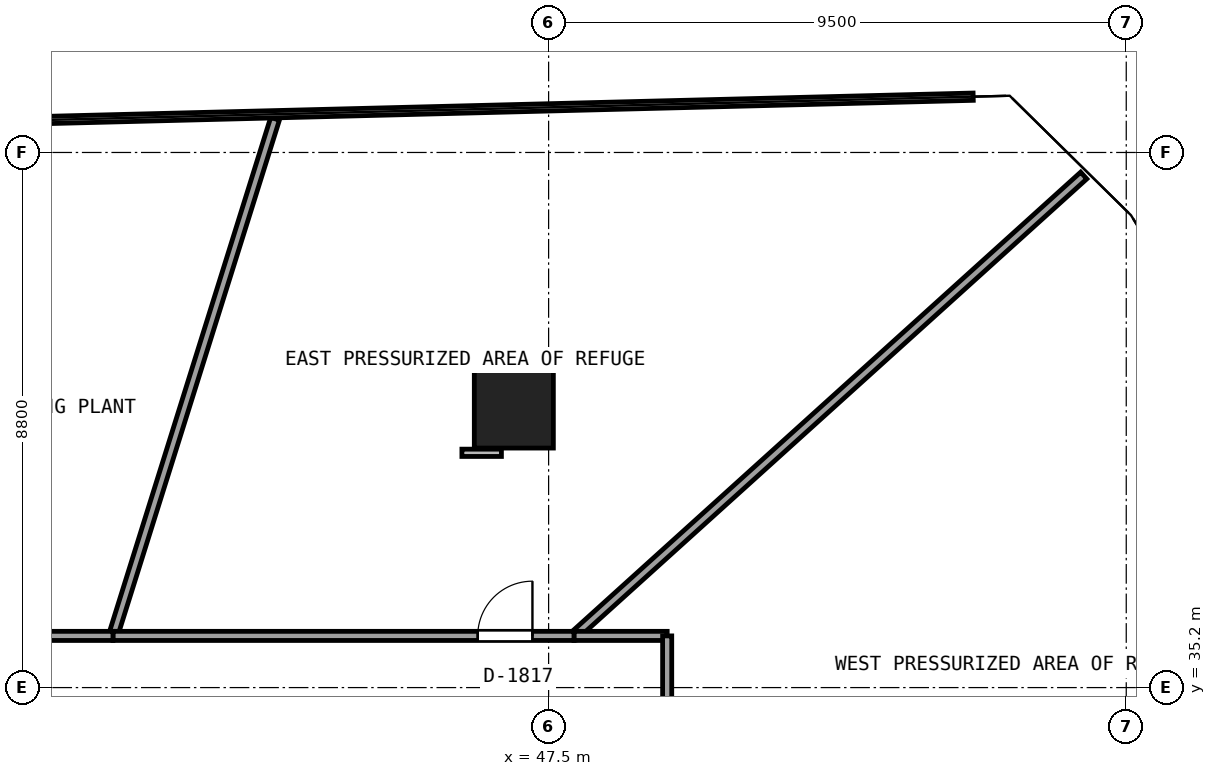
"""IFC4 building model, lengths in metres.
Left out: names, types, materials, properties, quantities, classifications, styles, units other than length and angle.
Written with IfcOpenShell. Run it as: python <this file> out.ifc"""

import sys

from ifc_helpers import new_model, si_unit, direction, frame, frame_2d, origin, origin_2d, place, context, subcontext, project, spatial, rectangle, extrude, element, fill, save


model = new_model("IFC4")
c1 = context("Model", 3, precision=1e-05, world=origin(), true_north=direction((0.0, 1.0)))
c2 = subcontext(c1, "Body", "Model", "MODEL_VIEW")
j1 = project(units=[si_unit("LENGTHUNIT", "METRE"), si_unit("PLANEANGLEUNIT", "RADIAN")], contexts=[c1])
p1 = place(None, origin())
s1 = spatial("IfcSite", under=j1, at=p1, CompositionType="ELEMENT")
p2 = place(p1, origin())
s2 = spatial("IfcBuilding", under=s1, at=p2, CompositionType="ELEMENT")
p3 = place(p2, frame((0.0, 0.0, 71.85)))
s3 = spatial("IfcBuildingStorey", under=s2, at=p3, CompositionType="ELEMENT", Elevation=71.85)
p4 = place(p3, frame((46.928, 39.789, 0.0), z_axis=(0.0, 0.0, 1.0), x_axis=(1.0, 0.0, 0.0)))
e1 = element("IfcColumn", 1, at=p4, inside=s3, PredefinedType="COLUMN", context=c2, shape_type="SweptSolid", body=[
    extrude(rectangle(XDim=1.3, YDim=1.3, at=origin_2d()), origin(), (0.0, 0.0, 1.0), 4.08),
])
p5 = place(p3, frame((56.301, 43.621, 0.0), z_axis=(0.0, 0.0, 1.0), x_axis=(-0.74217442222, -0.670206779287, 0.0)))
e2 = element("IfcWall", 2, at=p5, inside=s3, PredefinedType="PARTITIONING", context=c2, shape_type="SweptSolid", body=[
    extrude(rectangle(XDim=11.297, YDim=0.15, at=frame_2d((5.648, 0.0))), origin(), (0.0, 0.0, 1.0), 3.265),
])
p6 = place(p3, frame((47.917, 36.05, 0.0), z_axis=(0.0, 0.0, 1.0), x_axis=(1.0, 0.0, 0.0)))
e3 = element("IfcWall", 3, at=p6, inside=s3, PredefinedType="PARTITIONING", context=c2, shape_type="SweptSolid", body=[
    extrude(rectangle(XDim=1.533, YDim=0.15, at=frame_2d((0.767, 0.0))), origin(), (0.0, 0.0, 1.0), 3.265),
])
p7 = place(p3, frame((49.45, 36.05, 0.0), z_axis=(0.0, 0.0, 1.0), x_axis=(0.0, -1.0, 0.0)))
e4 = element("IfcWall", 4, at=p7, inside=s3, PredefinedType="PARTITIONING", context=c2, shape_type="SweptSolid", body=[
    extrude(rectangle(XDim=1.85, YDim=0.15, at=frame_2d((0.925, 0.0))), origin(), (0.0, 0.0, 1.0), 3.265),
])
p8 = place(p3, frame((43.001, 44.554, 0.0), z_axis=(0.0, 0.0, 1.0), x_axis=(-0.299148373838, -0.954206607832, 0.0)))
e5 = element("IfcWall", 5, at=p8, inside=s3, PredefinedType="PARTITIONING", context=c2, shape_type="SweptSolid", body=[
    extrude(rectangle(XDim=8.912, YDim=0.15, at=frame_2d((4.456, 0.0))), origin(), (0.0, 0.0, 1.0), 3.265),
])
p9 = place(p3, frame((40.335, 36.05, 0.0), z_axis=(0.0, 0.0, 1.0), x_axis=(1.0, 0.0, 0.0)))
e6 = element("IfcWall", 6, at=p9, inside=s3, PredefinedType="PARTITIONING", context=c2, shape_type="SweptSolid", body=[
    extrude(rectangle(XDim=7.582, YDim=0.15, at=frame_2d((3.791, 0.0))), origin(), (0.0, 0.0, 1.0), 3.065),
])
p10 = place(p9, frame((5.999, 0.0, 0.0)))
e7 = element("IfcOpeningElement", 7, at=p10, cuts=e6, PredefinedType="OPENING", context=c2, shape_type="SweptSolid", body=[
    extrude(rectangle(XDim=0.9, YDim=2.0, at=frame_2d((0.45, 1.0))), frame((0.0, 0.085, 0.0), z_axis=(0.0, -1.0, 0.0), x_axis=(1.0, 0.0, 0.0)), (0.0, 0.0, 1.0), 0.17),
])
p11 = place(p3, frame((35.149, 36.05, 0.0), z_axis=(0.0, 0.0, 1.0), x_axis=(1.0, 0.0, 0.0)))
e8 = element("IfcWall", 8, at=p11, inside=s3, PredefinedType="PARTITIONING", context=c2, shape_type="SweptSolid", body=[
    extrude(rectangle(XDim=5.186, YDim=0.15, at=frame_2d((2.593, 0.0))), origin(), (0.0, 0.0, 1.0), 3.065),
])
p12 = place(p11, frame((2.143, 0.0, 0.0)))
e9 = element("IfcOpeningElement", 9, at=p12, cuts=e8, PredefinedType="OPENING", context=c2, shape_type="SweptSolid", body=[
    extrude(rectangle(XDim=0.9, YDim=2.0, at=frame_2d((0.45, 1.0))), frame((0.0, 0.085, 0.0), z_axis=(0.0, -1.0, 0.0), x_axis=(1.0, 0.0, 0.0)), (0.0, 0.0, 1.0), 0.17),
])
p13 = place(p10, origin())
e10 = element("IfcDoor", 10, at=p13, inside=s3, OperationType="SINGLE_SWING_RIGHT", PredefinedType="DOOR", context=c2, shape_type="SweptSolid", body=[
    extrude(rectangle(XDim=0.9, YDim=2.0, at=frame_2d((0.45, 1.0))), frame((0.0, 0.025, 0.0), z_axis=(0.0, -1.0, 0.0), x_axis=(1.0, 0.0, 0.0)), (0.0, 0.0, 1.0), 0.05),
])
fill(e7, e10)
save(model, sys.argv[1])
